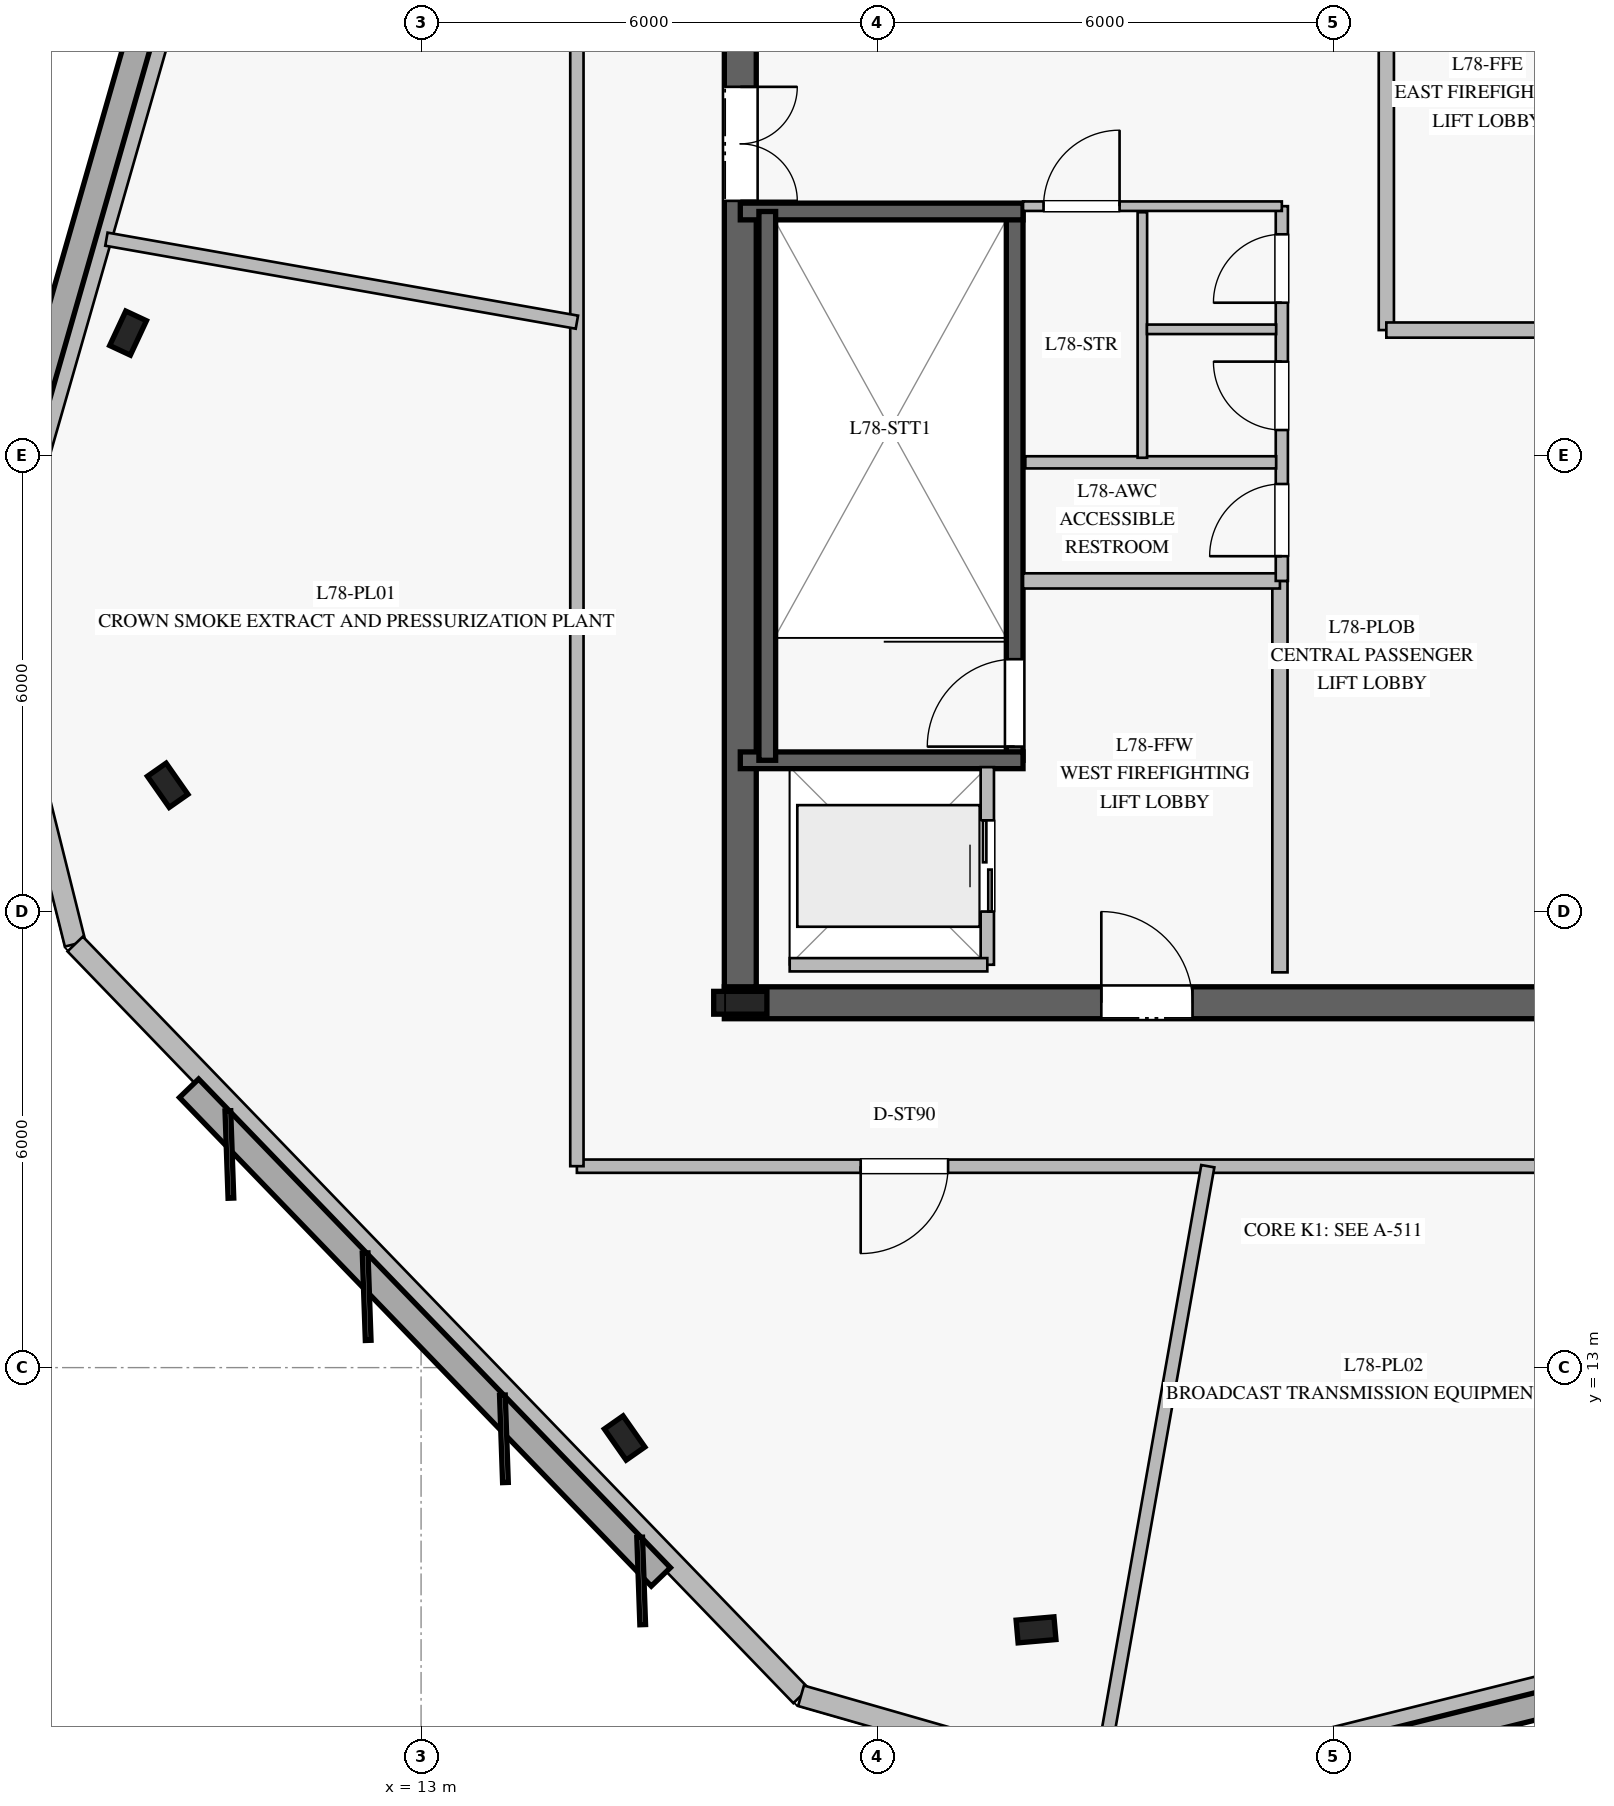
"""IFC4 building model, lengths in metres.
Left out: names, types, materials, properties, quantities, classifications, styles, units other than length and angle.
Written with IfcOpenShell. Run it as: python <this file> out.ifc"""

import sys

from ifc_helpers import new_model, si_unit, direction, frame, frame_2d, origin, origin_2d, place, context, subcontext, project, spatial, rectangle, i_section, extrude, element, fill, save


model = new_model("IFC4")
c1 = context("Model", 3, precision=1e-05, world=origin(), true_north=direction((0.0, 1.0)))
c2 = subcontext(c1, "Body", "Model", "MODEL_VIEW")
j1 = project(units=[si_unit("LENGTHUNIT", "METRE"), si_unit("PLANEANGLEUNIT", "RADIAN")], contexts=[c1])
p1 = place(None, origin())
s1 = spatial("IfcSite", under=j1, at=p1, CompositionType="ELEMENT")
p2 = place(p1, origin())
s2 = spatial("IfcBuilding", under=s1, at=p2, CompositionType="ELEMENT")
p3 = place(p2, frame((0.0, 0.0, 322.6)))
s3 = spatial("IfcBuildingStorey", under=s2, at=p3, CompositionType="ELEMENT", Elevation=322.6)
p4 = place(p3, frame((16.99, 17.8, 0.0), z_axis=(0.0, 0.0, 1.0), x_axis=(1.0, 0.0, 0.0)))
e1 = element("IfcWall", 1, at=p4, inside=s3, PredefinedType="SHEAR", context=c2, shape_type="SweptSolid", body=[
    extrude(rectangle(XDim=16.02, YDim=0.42, at=frame_2d((8.01, 0.0))), origin(), (0.0, 0.0, 1.0), 4.1),
])
p5 = place(p4, frame((4.96, 0.0, 0.0)))
e2 = element("IfcOpeningElement", 2, at=p5, cuts=e1, PredefinedType="OPENING", context=c2, shape_type="SweptSolid", body=[
    extrude(rectangle(XDim=1.2, YDim=2.25, at=frame_2d((0.6, 1.125))), frame((0.0, 0.22, 0.0), z_axis=(0.0, -1.0, 0.0), x_axis=(1.0, 0.0, 0.0)), (0.0, 0.0, 1.0), 0.44),
])
p6 = place(p4, frame((13.91, 0.0, 0.0)))
e3 = element("IfcOpeningElement", 3, at=p6, cuts=e1, PredefinedType="OPENING", context=c2, shape_type="SweptSolid", body=[
    extrude(rectangle(XDim=0.9, YDim=2.1, at=frame_2d((0.45, 1.05))), frame((0.0, 0.22, 0.0), z_axis=(0.0, -1.0, 0.0), x_axis=(1.0, 0.0, 0.0)), (0.0, 0.0, 1.0), 0.44),
])
p7 = place(p3, frame((17.2, 31.99, 0.0), z_axis=(0.0, 0.0, 1.0), x_axis=(0.0, -1.0, 0.0)))
e4 = element("IfcWall", 4, at=p7, inside=s3, PredefinedType="SHEAR", context=c2, shape_type="SweptSolid", body=[
    extrude(rectangle(XDim=13.98, YDim=0.42, at=frame_2d((6.99, 0.0))), origin(), (0.0, 0.0, 1.0), 4.1),
])
p8 = place(p7, frame((2.14, 0.0, 0.0)))
e5 = element("IfcOpeningElement", 5, at=p8, cuts=e4, PredefinedType="OPENING", context=c2, shape_type="SweptSolid", body=[
    extrude(rectangle(XDim=1.5, YDim=2.2, at=frame_2d((0.75, 1.1))), frame((0.0, 0.22, 0.0), z_axis=(0.0, -1.0, 0.0), x_axis=(1.0, 0.0, 0.0)), (0.0, 0.0, 1.0), 0.44),
])
p9 = place(p3, frame((17.2, 17.8, 0.0), z_axis=(0.0, 0.0, 1.0), x_axis=(1.0, 0.0, 0.0)))
e6 = element("IfcColumn", 6, at=p9, inside=s3, PredefinedType="COLUMN", context=c2, shape_type="SweptSolid", body=[
    extrude(i_section(OverallWidth=0.3, OverallDepth=0.7, WebThickness=0.017, FlangeThickness=0.032, at=origin_2d()), origin(), (0.0, 0.0, 1.0), 4.4),
])
p10 = place(p3, frame((20.81, 20.99, 0.0), z_axis=(0.0, 0.0, 1.0), x_axis=(0.0, 1.0, 0.0)))
e7 = element("IfcWall", 7, at=p10, inside=s3, PredefinedType="SOLIDWALL", context=c2, shape_type="SweptSolid", body=[
    extrude(rectangle(XDim=7.22, YDim=0.22, at=frame_2d((3.61, 0.0))), origin(), (0.0, 0.0, 1.0), 4.1),
])
p11 = place(p10, frame((0.18, 0.0, 0.0)))
e8 = element("IfcOpeningElement", 8, at=p11, cuts=e7, PredefinedType="OPENING", context=c2, shape_type="SweptSolid", body=[
    extrude(rectangle(XDim=1.15, YDim=2.2, at=frame_2d((0.575, 1.1))), frame((0.0, 0.12, 0.0), z_axis=(0.0, -1.0, 0.0), x_axis=(1.0, 0.0, 0.0)), (0.0, 0.0, 1.0), 0.24),
])
for number, where, z_axis, x_axis in (
    (9, (17.2, 20.99, 0.0), (0.0, 0.0, 1.0), (1.0, 0.0, 0.0)),
    (10, (17.2, 28.21, 0.0), (0.0, 0.0, 1.0), (1.0, 0.0, 0.0)),
):
    element("IfcWall", number, at=place(p3, frame(where, z_axis=z_axis, x_axis=x_axis)), inside=s3, PredefinedType="SOLIDWALL", context=c2, shape_type="SweptSolid", body=[
        extrude(rectangle(XDim=3.72, YDim=0.22, at=frame_2d((1.86, 0.0))), origin(), (0.0, 0.0, 1.0), 4.1),
    ])
p12 = place(p3, frame((17.555, 28.21, 0.0), z_axis=(0.0, 0.0, 1.0), x_axis=(0.0, -1.0, 0.0)))
e11 = element("IfcWall", 11, at=p12, inside=s3, PredefinedType="SOLIDWALL", context=c2, shape_type="SweptSolid", body=[
    extrude(rectangle(XDim=7.22, YDim=0.22, at=frame_2d((3.61, 0.0))), origin(), (0.0, 0.0, 1.0), 4.1),
])
for number, where, z_axis, x_axis in (
    (12, (9.145, 26.61, 0.0), (0.0, 0.0, 1.0), (0.423, 0.906, 0.0)),
    (13, (9.666, 20.661, 0.0), (0.0, 0.0, 1.0), (-0.574, 0.819, 0.0)),
    (14, (15.678, 12.074, 0.0), (0.0, 0.0, 1.0), (-0.574, 0.819, 0.0)),
    (15, (21.091, 9.55, 0.0), (0.0, 0.0, 1.0), (0.996, 0.087, 0.0)),
):
    element("IfcColumn", number, at=place(p3, frame(where, z_axis=z_axis, x_axis=x_axis)), inside=s3, PredefinedType="COLUMN", context=c2, shape_type="SweptSolid", body=[
        extrude(i_section(OverallWidth=0.3, OverallDepth=0.5, WebThickness=0.014, FlangeThickness=0.028, at=origin_2d()), origin(), (0.0, 0.0, 1.0), 4.4),
    ])
p13 = place(p3, frame((11.158, 36.12, 0.0), z_axis=(0.0, 0.0, 1.0), x_axis=(-0.275616991697, -0.961267535022, 0.0)))
e16 = element("IfcWall", 16, at=p13, inside=s3, PredefinedType="STANDARD", context=c2, shape_type="SweptSolid", body=[
    extrude(rectangle(XDim=13.748, YDim=0.28, at=frame_2d((6.874, 0.0))), origin(), (0.0, 0.0, 1.0), 4.1),
])
p14 = place(p3, frame((7.369, 22.905, 0.0), z_axis=(0.0, 0.0, 1.0), x_axis=(0.241917978668, -0.970296702868, 0.0)))
e17 = element("IfcWall", 17, at=p14, inside=s3, PredefinedType="STANDARD", context=c2, shape_type="SweptSolid", body=[
    extrude(rectangle(XDim=4.465, YDim=0.28, at=frame_2d((2.232, 0.0))), origin(), (0.0, 0.0, 1.0), 4.1),
])
p15 = place(p3, frame((8.449, 18.573, 0.0), z_axis=(0.0, 0.0, 1.0), x_axis=(0.69463919692, -0.719358315516, 0.0)))
e18 = element("IfcWall", 18, at=p15, inside=s3, PredefinedType="STANDARD", context=c2, shape_type="SweptSolid", body=[
    extrude(rectangle(XDim=13.748, YDim=0.28, at=frame_2d((6.874, 0.0))), origin(), (0.0, 0.0, 1.0), 4.1),
])
p16 = place(p3, frame((17.999, 8.683, 0.0), z_axis=(0.0, 0.0, 1.0), x_axis=(0.961215848043, -0.275797196272, 0.0)))
e19 = element("IfcWall", 19, at=p16, inside=s3, PredefinedType="STANDARD", context=c2, shape_type="SweptSolid", body=[
    extrude(rectangle(XDim=4.464, YDim=0.28, at=frame_2d((2.232, 0.0))), origin(), (0.0, 0.0, 1.0), 4.1),
])
p17 = place(p3, frame((22.29, 7.452, 0.0), z_axis=(0.0, 0.0, 1.0), x_axis=(0.970292733591, 0.241933898288, 0.0)))
e20 = element("IfcWall", 20, at=p17, inside=s3, PredefinedType="STANDARD", context=c2, shape_type="SweptSolid", body=[
    extrude(rectangle(XDim=13.748, YDim=0.28, at=frame_2d((6.874, 0.0))), origin(), (0.0, 0.0, 1.0), 4.1),
])
p18 = place(p3, frame((24.3, 18.2, 0.0), z_axis=(0.0, 0.0, 1.0), x_axis=(0.0, 1.0, 0.0)))
e21 = element("IfcWall", 21, at=p18, inside=s3, PredefinedType="PARTITIONING", context=c2, shape_type="SweptSolid", body=[
    extrude(rectangle(XDim=5.15, YDim=0.2, at=frame_2d((2.575, 0.0))), origin(), (0.0, 0.0, 1.0), 3.37),
])
p19 = place(p3, frame((20.92, 23.35, 0.0), z_axis=(0.0, 0.0, 1.0), x_axis=(1.0, 0.0, 0.0)))
e22 = element("IfcWall", 22, at=p19, inside=s3, PredefinedType="PARTITIONING", context=c2, shape_type="SweptSolid", body=[
    extrude(rectangle(XDim=3.38, YDim=0.2, at=frame_2d((1.69, 0.0))), origin(), (0.0, 0.0, 1.0), 2.82),
])
p20 = place(p3, frame((25.7, 26.65, 0.0), z_axis=(0.0, 0.0, 1.0), x_axis=(0.0, 1.0, 0.0)))
e23 = element("IfcWall", 23, at=p20, inside=s3, PredefinedType="PARTITIONING", context=c2, shape_type="SweptSolid", body=[
    extrude(rectangle(XDim=5.15, YDim=0.2, at=frame_2d((2.575, 0.0))), origin(), (0.0, 0.0, 1.0), 3.37),
])
p21 = place(p3, frame((25.7, 26.65, 0.0), z_axis=(0.0, 0.0, 1.0), x_axis=(1.0, 0.0, 0.0)))
e24 = element("IfcWall", 24, at=p21, inside=s3, PredefinedType="PARTITIONING", context=c2, shape_type="SweptSolid", body=[
    extrude(rectangle(XDim=3.38, YDim=0.2, at=frame_2d((1.69, 0.0))), origin(), (0.0, 0.0, 1.0), 2.82),
])
p22 = place(p3, frame((24.325, 23.35, 0.0), z_axis=(0.0, 0.0, 1.0), x_axis=(0.0, 1.0, 0.0)))
e25 = element("IfcWall", 25, at=p22, inside=s3, PredefinedType="PLUMBINGWALL", context=c2, shape_type="SweptSolid", body=[
    extrude(rectangle(XDim=4.93, YDim=0.16, at=frame_2d((2.465, 0.0))), origin(), (0.0, 0.0, 1.0), 2.82),
])
p23 = place(p22, frame((0.325, 0.0, 0.0)))
e26 = element("IfcOpeningElement", 26, at=p23, cuts=e25, PredefinedType="OPENING", context=c2, shape_type="SweptSolid", body=[
    extrude(rectangle(XDim=0.95, YDim=2.1, at=frame_2d((0.475, 1.05))), frame((0.0, 0.09, 0.0), z_axis=(0.0, -1.0, 0.0), x_axis=(1.0, 0.0, 0.0)), (0.0, 0.0, 1.0), 0.18),
])
p24 = place(p22, frame((1.985, 0.0, 0.0)))
e27 = element("IfcOpeningElement", 27, at=p24, cuts=e25, PredefinedType="OPENING", context=c2, shape_type="SweptSolid", body=[
    extrude(rectangle(XDim=0.9, YDim=2.1, at=frame_2d((0.45, 1.05))), frame((0.0, 0.09, 0.0), z_axis=(0.0, -1.0, 0.0), x_axis=(1.0, 0.0, 0.0)), (0.0, 0.0, 1.0), 0.18),
])
p25 = place(p22, frame((3.66, 0.0, 0.0)))
e28 = element("IfcOpeningElement", 28, at=p25, cuts=e25, PredefinedType="OPENING", context=c2, shape_type="SweptSolid", body=[
    extrude(rectangle(XDim=0.9, YDim=2.1, at=frame_2d((0.45, 1.05))), frame((0.0, 0.09, 0.0), z_axis=(0.0, -1.0, 0.0), x_axis=(1.0, 0.0, 0.0)), (0.0, 0.0, 1.0), 0.18),
])
p26 = place(p3, frame((20.92, 28.28, 0.0), z_axis=(0.0, 0.0, 1.0), x_axis=(1.0, 0.0, 0.0)))
e29 = element("IfcWall", 29, at=p26, inside=s3, PredefinedType="PARTITIONING", context=c2, shape_type="SweptSolid", body=[
    extrude(rectangle(XDim=3.405, YDim=0.125, at=frame_2d((1.703, 0.0))), origin(), (0.0, 0.0, 1.0), 2.82),
])
p27 = place(p26, frame((0.27, 0.0, 0.0)))
e30 = element("IfcOpeningElement", 30, at=p27, cuts=e29, PredefinedType="OPENING", context=c2, shape_type="SweptSolid", body=[
    extrude(rectangle(XDim=1.0, YDim=2.15, at=frame_2d((0.5, 1.075))), frame((0.0, 0.073, 0.0), z_axis=(0.0, -1.0, 0.0), x_axis=(1.0, 0.0, 0.0)), (0.0, 0.0, 1.0), 0.145),
])
p28 = place(p3, frame((20.95, 24.91, 0.0), z_axis=(0.0, 0.0, 1.0), x_axis=(1.0, 0.0, 0.0)))
e31 = element("IfcWall", 31, at=p28, inside=s3, PredefinedType="PLUMBINGWALL", context=c2, shape_type="SweptSolid", body=[
    extrude(rectangle(XDim=3.3, YDim=0.16, at=frame_2d((1.65, 0.0))), origin(), (0.0, 0.0, 1.0), 2.82),
])
p29 = place(p3, frame((22.49, 24.97, 0.0), z_axis=(0.0, 0.0, 1.0), x_axis=(0.0, 1.0, 0.0)))
e32 = element("IfcWall", 32, at=p29, inside=s3, PredefinedType="PARTITIONING", context=c2, shape_type="SweptSolid", body=[
    extrude(rectangle(XDim=3.23, YDim=0.125, at=frame_2d((1.615, 0.0))), origin(), (0.0, 0.0, 1.0), 2.82),
])
p30 = place(p3, frame((22.55, 26.66, 0.0), z_axis=(0.0, 0.0, 1.0), x_axis=(1.0, 0.0, 0.0)))
e33 = element("IfcWall", 33, at=p30, inside=s3, PredefinedType="PARTITIONING", context=c2, shape_type="SweptSolid", body=[
    extrude(rectangle(XDim=1.7, YDim=0.125, at=frame_2d((0.85, 0.0))), origin(), (0.0, 0.0, 1.0), 2.82),
])
p31 = place(p3, frame((20.45, 18.3, 0.0), z_axis=(0.0, 0.0, 1.0), x_axis=(0.0, 1.0, 0.0)))
e34 = element("IfcWall", 34, at=p31, inside=s3, PredefinedType="PARTITIONING", context=c2, shape_type="SweptSolid", body=[
    extrude(rectangle(XDim=2.6, YDim=0.175, at=frame_2d((1.3, 0.0))), origin(), (0.0, 0.0, 1.0), 4.17),
])
p32 = place(p31, frame((0.7, 0.0, 0.0)))
e35 = element("IfcOpeningElement", 35, at=p32, cuts=e34, PredefinedType="OPENING", context=c2, shape_type="SweptSolid", body=[
    extrude(rectangle(XDim=1.2, YDim=2.2, at=frame_2d((0.6, 1.1))), frame((0.0, 0.098, 0.0), z_axis=(0.0, -1.0, 0.0), x_axis=(1.0, 0.0, 0.0)), (0.0, 0.0, 1.0), 0.195),
])
p33 = place(p3, frame((17.85, 18.3, 0.0), z_axis=(0.0, 0.0, 1.0), x_axis=(1.0, 0.0, 0.0)))
e36 = element("IfcWall", 36, at=p33, inside=s3, PredefinedType="PARTITIONING", context=c2, shape_type="SweptSolid", body=[
    extrude(rectangle(XDim=2.6, YDim=0.175, at=frame_2d((1.3, 0.0))), origin(), (0.0, 0.0, 1.0), 4.17),
])
p34 = place(p3, frame((34.95, 15.65, 0.0), z_axis=(0.0, 0.0, 1.0), x_axis=(-1.0, 0.0, 0.0)))
e37 = element("IfcWall", 37, at=p34, inside=s3, PredefinedType="PARTITIONING", context=c2, shape_type="SweptSolid", body=[
    extrude(rectangle(XDim=19.9, YDim=0.175, at=frame_2d((9.95, 0.0))), origin(), (0.0, 0.0, 1.0), 3.6),
])
p35 = place(p34, frame((15.016, 0.0, 0.0)))
e38 = element("IfcOpeningElement", 38, at=p35, cuts=e37, PredefinedType="OPENING", context=c2, shape_type="SweptSolid", body=[
    extrude(rectangle(XDim=1.15, YDim=2.2, at=frame_2d((0.575, 1.1))), frame((0.0, 0.098, 0.0), z_axis=(0.0, -1.0, 0.0), x_axis=(1.0, 0.0, 0.0)), (0.0, 0.0, 1.0), 0.195),
])
p36 = place(p3, frame((15.05, 15.65, 0.0), z_axis=(0.0, 0.0, 1.0), x_axis=(0.0, 1.0, 0.0)))
e39 = element("IfcWall", 39, at=p36, inside=s3, PredefinedType="PARTITIONING", context=c2, shape_type="SweptSolid", body=[
    extrude(rectangle(XDim=18.7, YDim=0.175, at=frame_2d((9.35, 0.0))), origin(), (0.0, 0.0, 1.0), 3.6),
])
p37 = place(p3, frame((15.05, 26.754, 0.0), z_axis=(0.0, 0.0, 1.0), x_axis=(-0.984791769213, 0.173738801913, 0.0)))
e40 = element("IfcWall", 40, at=p37, inside=s3, PredefinedType="PARTITIONING", context=c2, shape_type="SweptSolid", body=[
    extrude(rectangle(XDim=6.286, YDim=0.175, at=frame_2d((3.143, 0.0))), origin(), (0.0, 0.0, 1.0), 3.6),
])
p38 = place(p3, frame((23.351, 15.65, 0.0), z_axis=(0.0, 0.0, 1.0), x_axis=(-0.173619687581, -0.984812776158, 0.0)))
e41 = element("IfcWall", 41, at=p38, inside=s3, PredefinedType="PARTITIONING", context=c2, shape_type="SweptSolid", body=[
    extrude(rectangle(XDim=8.156, YDim=0.175, at=frame_2d((4.078, 0.0))), origin(), (0.0, 0.0, 1.0), 3.6),
])
p39 = place(p11, origin())
e42 = element("IfcDoor", 42, at=p39, inside=s3, OperationType="SINGLE_SWING_LEFT", PredefinedType="DOOR", context=c2, shape_type="SweptSolid", body=[
    extrude(rectangle(XDim=1.15, YDim=2.2, at=frame_2d((0.575, 1.1))), frame((0.0, 0.025, 0.0), z_axis=(0.0, -1.0, 0.0), x_axis=(1.0, 0.0, 0.0)), (0.0, 0.0, 1.0), 0.05),
])
fill(e8, e42)
p40 = place(p5, origin())
e43 = element("IfcDoor", 43, at=p40, inside=s3, OperationType="SINGLE_SWING_LEFT", PredefinedType="DOOR", context=c2, shape_type="SweptSolid", body=[
    extrude(rectangle(XDim=1.2, YDim=2.25, at=frame_2d((0.6, 1.125))), frame((0.0, 0.025, 0.0), z_axis=(0.0, -1.0, 0.0), x_axis=(1.0, 0.0, 0.0)), (0.0, 0.0, 1.0), 0.05),
])
fill(e2, e43)
p41 = place(p8, origin())
e44 = element("IfcDoor", 44, at=p41, inside=s3, OperationType="DOUBLE_DOOR_SINGLE_SWING", PredefinedType="DOOR", context=c2, shape_type="SweptSolid", body=[
    extrude(rectangle(XDim=1.5, YDim=2.2, at=frame_2d((0.75, 1.1))), frame((0.0, 0.025, 0.0), z_axis=(0.0, -1.0, 0.0), x_axis=(1.0, 0.0, 0.0)), (0.0, 0.0, 1.0), 0.05),
])
fill(e5, e44)
p42 = place(p23, origin())
e45 = element("IfcDoor", 45, at=p42, inside=s3, OperationType="SINGLE_SWING_LEFT", PredefinedType="DOOR", context=c2, shape_type="SweptSolid", body=[
    extrude(rectangle(XDim=0.95, YDim=2.1, at=frame_2d((0.475, 1.05))), frame((0.0, 0.025, 0.0), z_axis=(0.0, -1.0, 0.0), x_axis=(1.0, 0.0, 0.0)), (0.0, 0.0, 1.0), 0.05),
])
fill(e26, e45)
p43 = place(p24, origin())
e46 = element("IfcDoor", 46, at=p43, inside=s3, OperationType="SINGLE_SWING_RIGHT", PredefinedType="DOOR", context=c2, shape_type="SweptSolid", body=[
    extrude(rectangle(XDim=0.9, YDim=2.1, at=frame_2d((0.45, 1.05))), frame((0.0, 0.025, 0.0), z_axis=(0.0, -1.0, 0.0), x_axis=(1.0, 0.0, 0.0)), (0.0, 0.0, 1.0), 0.05),
])
fill(e27, e46)
p44 = place(p25, origin())
e47 = element("IfcDoor", 47, at=p44, inside=s3, OperationType="SINGLE_SWING_LEFT", PredefinedType="DOOR", context=c2, shape_type="SweptSolid", body=[
    extrude(rectangle(XDim=0.9, YDim=2.1, at=frame_2d((0.45, 1.05))), frame((0.0, 0.025, 0.0), z_axis=(0.0, -1.0, 0.0), x_axis=(1.0, 0.0, 0.0)), (0.0, 0.0, 1.0), 0.05),
])
fill(e28, e47)
p45 = place(p27, origin())
e48 = element("IfcDoor", 48, at=p45, inside=s3, OperationType="SINGLE_SWING_RIGHT", PredefinedType="DOOR", context=c2, shape_type="SweptSolid", body=[
    extrude(rectangle(XDim=1.0, YDim=2.15, at=frame_2d((0.5, 1.075))), frame((0.0, 0.025, 0.0), z_axis=(0.0, -1.0, 0.0), x_axis=(1.0, 0.0, 0.0)), (0.0, 0.0, 1.0), 0.05),
])
fill(e30, e48)
p46 = place(p32, origin())
e49 = element("IfcDoor", 49, at=p46, inside=s3, OperationType="DOUBLE_DOOR_SLIDING", PredefinedType="DOOR", context=c2, shape_type="SweptSolid", body=[
    extrude(rectangle(XDim=1.2, YDim=2.2, at=frame_2d((0.6, 1.1))), frame((0.0, 0.025, 0.0), z_axis=(0.0, -1.0, 0.0), x_axis=(1.0, 0.0, 0.0)), (0.0, 0.0, 1.0), 0.05),
])
fill(e35, e49)
p47 = place(p35, origin())
e50 = element("IfcDoor", 50, at=p47, inside=s3, OperationType="SINGLE_SWING_RIGHT", PredefinedType="DOOR", context=c2, shape_type="SweptSolid", body=[
    extrude(rectangle(XDim=1.15, YDim=2.2, at=frame_2d((0.575, 1.1))), frame((0.0, 0.025, 0.0), z_axis=(0.0, -1.0, 0.0), x_axis=(1.0, 0.0, 0.0)), (0.0, 0.0, 1.0), 0.05),
])
fill(e38, e50)
save(model, sys.argv[1])
